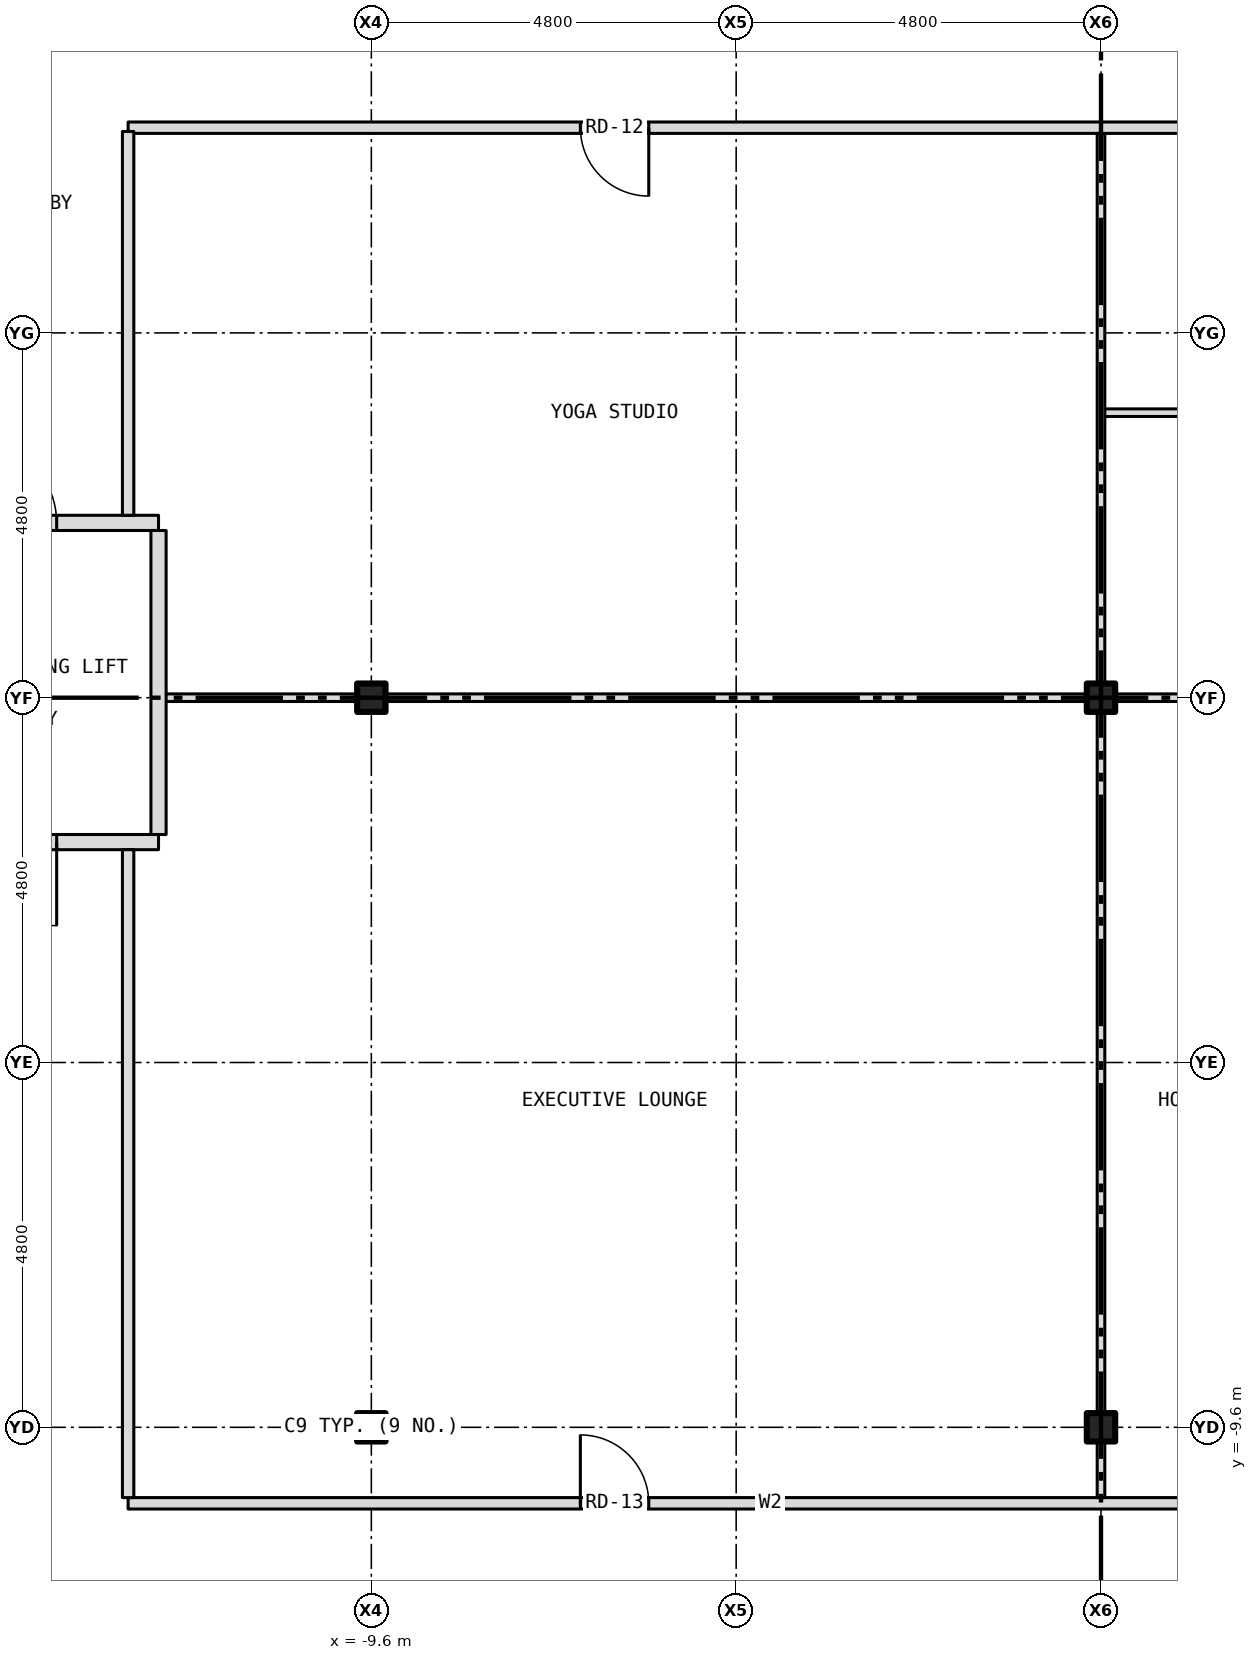
"""IFC4 building model, lengths in metres.
Left out: names, types, materials, properties, quantities, classifications, styles, units other than length and angle.
Written with IfcOpenShell. Run it as: python <this file> out.ifc"""

import sys

from ifc_helpers import new_model, si_unit, direction, frame, frame_2d, origin, origin_2d, place, context, subcontext, project, spatial, rectangle, i_section, extrude, element, fill, save


model = new_model("IFC4")
c1 = context("Model", 3, precision=1e-05, world=origin(), true_north=direction((0.0, 1.0)))
c2 = subcontext(c1, "Body", "Model", "MODEL_VIEW")
j1 = project(units=[si_unit("LENGTHUNIT", "METRE"), si_unit("PLANEANGLEUNIT", "RADIAN")], contexts=[c1])
p1 = place(None, origin())
s1 = spatial("IfcSite", under=j1, at=p1, CompositionType="ELEMENT")
p2 = place(p1, origin())
s2 = spatial("IfcBuilding", under=s1, at=p2, CompositionType="ELEMENT")
p3 = place(p2, frame((0.0, 0.0, 201.5)))
s3 = spatial("IfcBuildingStorey", under=s2, at=p3, CompositionType="ELEMENT", Elevation=201.5)
for number, where, z_axis, x_axis in (
    (1, (-9.6, -9.6, -0.15), (0.0, 0.0, 1.0), (1.0, 0.0, 0.0)),
    (2, (-9.6, 0.0, -0.15), (0.0, 0.0, 1.0), (1.0, 0.0, 0.0)),
    (3, (0.0, -9.6, -0.15), (0.0, 0.0, 1.0), (1.0, 0.0, 0.0)),
    (4, (0.0, 0.0, -0.15), (0.0, 0.0, 1.0), (1.0, 0.0, 0.0)),
):
    element("IfcColumn", number, at=place(p3, frame(where, z_axis=z_axis, x_axis=x_axis)), inside=s3, PredefinedType="COLUMN", context=c2, shape_type="SweptSolid", body=[
        extrude(i_section(OverallWidth=0.373, OverallDepth=0.373, WebThickness=0.016, FlangeThickness=0.026, at=origin_2d()), origin(), (0.0, 0.0, 1.0), 3.5),
    ])
p4 = place(p3, frame((-12.8, -10.6, 0.0), z_axis=(0.0, 0.0, 1.0), x_axis=(1.0, 0.0, 0.0)))
e5 = element("IfcWall", 5, at=p4, inside=s3, PredefinedType="PARTITIONING", context=c2, shape_type="SweptSolid", body=[
    extrude(rectangle(XDim=16.9, YDim=0.15, at=frame_2d((8.45, 0.0))), origin(), (0.0, 0.0, 1.0), 3.35),
])
p5 = place(p4, frame((5.95, 0.0, 0.0)))
e6 = element("IfcOpeningElement", 6, at=p5, cuts=e5, PredefinedType="OPENING", context=c2, shape_type="SweptSolid", body=[
    extrude(rectangle(XDim=0.9, YDim=2.1, at=frame_2d((0.45, 1.05))), frame((0.0, 0.087, 0.0), z_axis=(0.0, -1.0, 0.0), x_axis=(1.0, 0.0, 0.0)), (0.0, 0.0, 1.0), 0.174),
])
p6 = place(p3, frame((-15.68, -1.9, 0.0), z_axis=(0.0, 0.0, 1.0), x_axis=(1.0, 0.0, 0.0)))
e7 = element("IfcWall", 7, at=p6, inside=s3, PredefinedType="PARTITIONING", context=c2, shape_type="SweptSolid", body=[
    extrude(rectangle(XDim=3.28, YDim=0.2, at=frame_2d((1.64, 0.0))), origin(), (0.0, 0.0, 1.0), 3.35),
])
p7 = place(p6, frame((0.84, 0.0, 0.0)))
e8 = element("IfcOpeningElement", 8, at=p7, cuts=e7, PredefinedType="OPENING", context=c2, shape_type="SweptSolid", body=[
    extrude(rectangle(XDim=1.1, YDim=2.1, at=frame_2d((0.55, 1.05))), frame((0.0, 0.112, 0.0), z_axis=(0.0, -1.0, 0.0), x_axis=(1.0, 0.0, 0.0)), (0.0, 0.0, 1.0), 0.224),
])
p8 = place(p3, frame((-12.4, 0.0, 0.0), z_axis=(0.0, 0.0, 1.0), x_axis=(1.0, 0.0, 0.0)))
e9 = element("IfcWall", 9, at=p8, inside=s3, PredefinedType="PARTITIONING", context=c2, shape_type="SweptSolid", body=[
    extrude(rectangle(XDim=2.613, YDim=0.1, at=frame_2d((1.306, 0.0))), origin(), (0.0, 0.0, 1.0), 2.728),
])
p9 = place(p3, frame((-9.787, 0.0, 0.0), z_axis=(0.0, 0.0, 1.0), x_axis=(1.0, 0.0, 0.0)))
e10 = element("IfcWall", 10, at=p9, inside=s3, PredefinedType="PARTITIONING", context=c2, shape_type="SweptSolid", body=[
    extrude(rectangle(XDim=0.374, YDim=0.1, at=frame_2d((0.187, 0.0))), origin(), (0.0, 0.0, 1.0), 3.35),
])
p10 = place(p3, frame((-9.413, 0.0, 0.0), z_axis=(0.0, 0.0, 1.0), x_axis=(1.0, 0.0, 0.0)))
e11 = element("IfcWall", 11, at=p10, inside=s3, PredefinedType="PARTITIONING", context=c2, shape_type="SweptSolid", body=[
    extrude(rectangle(XDim=9.226, YDim=0.1, at=frame_2d((4.613, 0.0))), origin(), (0.0, 0.0, 1.0), 2.728),
])
p11 = place(p3, frame((-0.187, 0.0, 0.0), z_axis=(0.0, 0.0, 1.0), x_axis=(1.0, 0.0, 0.0)))
e12 = element("IfcWall", 12, at=p11, inside=s3, PredefinedType="PARTITIONING", context=c2, shape_type="SweptSolid", body=[
    extrude(rectangle(XDim=0.374, YDim=0.1, at=frame_2d((0.187, 0.0))), origin(), (0.0, 0.0, 1.0), 3.35),
])
p12 = place(p3, frame((0.187, 0.0, 0.0), z_axis=(0.0, 0.0, 1.0), x_axis=(1.0, 0.0, 0.0)))
e13 = element("IfcWall", 13, at=p12, inside=s3, PredefinedType="PARTITIONING", context=c2, shape_type="SweptSolid", body=[
    extrude(rectangle(XDim=3.913, YDim=0.1, at=frame_2d((1.957, 0.0))), origin(), (0.0, 0.0, 1.0), 2.728),
])
p13 = place(p3, frame((-15.68, 2.3, 0.0), z_axis=(0.0, 0.0, 1.0), x_axis=(1.0, 0.0, 0.0)))
e14 = element("IfcWall", 14, at=p13, inside=s3, PredefinedType="PARTITIONING", context=c2, shape_type="SweptSolid", body=[
    extrude(rectangle(XDim=3.28, YDim=0.2, at=frame_2d((1.64, 0.0))), origin(), (0.0, 0.0, 1.0), 3.35),
])
p14 = place(p13, frame((0.84, 0.0, 0.0)))
e15 = element("IfcOpeningElement", 15, at=p14, cuts=e14, PredefinedType="OPENING", context=c2, shape_type="SweptSolid", body=[
    extrude(rectangle(XDim=1.1, YDim=2.1, at=frame_2d((0.55, 1.05))), frame((0.0, 0.112, 0.0), z_axis=(0.0, -1.0, 0.0), x_axis=(1.0, 0.0, 0.0)), (0.0, 0.0, 1.0), 0.224),
])
p15 = place(p3, frame((0.0, 3.75, 0.0), z_axis=(0.0, 0.0, 1.0), x_axis=(1.0, 0.0, 0.0)))
e16 = element("IfcWall", 16, at=p15, inside=s3, PredefinedType="PARTITIONING", context=c2, shape_type="SweptSolid", body=[
    extrude(rectangle(XDim=4.1, YDim=0.1, at=frame_2d((2.05, 0.0))), origin(), (0.0, 0.0, 1.0), 3.35),
])
p16 = place(p3, frame((-12.8, 7.5, 0.0), z_axis=(0.0, 0.0, 1.0), x_axis=(1.0, 0.0, 0.0)))
e17 = element("IfcWall", 17, at=p16, inside=s3, PredefinedType="PARTITIONING", context=c2, shape_type="SweptSolid", body=[
    extrude(rectangle(XDim=16.9, YDim=0.15, at=frame_2d((8.45, 0.0))), origin(), (0.0, 0.0, 1.0), 3.35),
])
p17 = place(p16, frame((14.4, 0.0, 0.0)))
e18 = element("IfcOpeningElement", 18, at=p17, cuts=e17, PredefinedType="OPENING", context=c2, shape_type="SweptSolid", body=[
    extrude(rectangle(XDim=0.9, YDim=2.1, at=frame_2d((0.45, 1.05))), frame((0.0, 0.087, 0.0), z_axis=(0.0, -1.0, 0.0), x_axis=(1.0, 0.0, 0.0)), (0.0, 0.0, 1.0), 0.174),
])
p18 = place(p16, frame((5.95, 0.0, 0.0)))
e19 = element("IfcOpeningElement", 19, at=p18, cuts=e17, PredefinedType="OPENING", context=c2, shape_type="SweptSolid", body=[
    extrude(rectangle(XDim=0.9, YDim=2.1, at=frame_2d((0.45, 1.05))), frame((0.0, 0.087, 0.0), z_axis=(0.0, -1.0, 0.0), x_axis=(1.0, 0.0, 0.0)), (0.0, 0.0, 1.0), 0.174),
])
p19 = place(p3, frame((-12.8, -10.525, 0.0), z_axis=(0.0, 0.0, 1.0), x_axis=(0.0, 1.0, 0.0)))
e20 = element("IfcWall", 20, at=p19, inside=s3, PredefinedType="PARTITIONING", context=c2, shape_type="SweptSolid", body=[
    extrude(rectangle(XDim=8.525, YDim=0.15, at=frame_2d((4.262, 0.0))), origin(), (0.0, 0.0, 1.0), 3.35),
])
p20 = place(p3, frame((-12.8, 2.4, 0.0), z_axis=(0.0, 0.0, 1.0), x_axis=(0.0, 1.0, 0.0)))
e21 = element("IfcWall", 21, at=p20, inside=s3, PredefinedType="PARTITIONING", context=c2, shape_type="SweptSolid", body=[
    extrude(rectangle(XDim=5.05, YDim=0.15, at=frame_2d((2.525, 0.0))), origin(), (0.0, 0.0, 1.0), 3.35),
])
p21 = place(p3, frame((-12.4, -1.8, 0.0), z_axis=(0.0, 0.0, 1.0), x_axis=(0.0, 1.0, 0.0)))
e22 = element("IfcWall", 22, at=p21, inside=s3, PredefinedType="PARTITIONING", context=c2, shape_type="SweptSolid", body=[
    extrude(rectangle(XDim=4.0, YDim=0.2, at=frame_2d((2.0, 0.0))), origin(), (0.0, 0.0, 1.0), 3.35),
])
p22 = place(p3, frame((0.0, -10.525, 0.0), z_axis=(0.0, 0.0, 1.0), x_axis=(0.0, 1.0, 0.0)))
e23 = element("IfcWall", 23, at=p22, inside=s3, PredefinedType="PARTITIONING", context=c2, shape_type="SweptSolid", body=[
    extrude(rectangle(XDim=0.738, YDim=0.1, at=frame_2d((0.369, 0.0))), origin(), (0.0, 0.0, 1.0), 2.728),
])
p23 = place(p3, frame((0.0, -9.787, 0.0), z_axis=(0.0, 0.0, 1.0), x_axis=(0.0, 1.0, 0.0)))
e24 = element("IfcWall", 24, at=p23, inside=s3, PredefinedType="PARTITIONING", context=c2, shape_type="SweptSolid", body=[
    extrude(rectangle(XDim=0.374, YDim=0.1, at=frame_2d((0.187, 0.0))), origin(), (0.0, 0.0, 1.0), 3.35),
])
p24 = place(p3, frame((0.0, -9.413, 0.0), z_axis=(0.0, 0.0, 1.0), x_axis=(0.0, 1.0, 0.0)))
e25 = element("IfcWall", 25, at=p24, inside=s3, PredefinedType="PARTITIONING", context=c2, shape_type="SweptSolid", body=[
    extrude(rectangle(XDim=9.363, YDim=0.1, at=frame_2d((4.682, 0.0))), origin(), (0.0, 0.0, 1.0), 2.728),
])
p25 = place(p3, frame((0.0, 0.05, 0.0), z_axis=(0.0, 0.0, 1.0), x_axis=(0.0, 1.0, 0.0)))
e26 = element("IfcWall", 26, at=p25, inside=s3, PredefinedType="PARTITIONING", context=c2, shape_type="SweptSolid", body=[
    extrude(rectangle(XDim=7.375, YDim=0.1, at=frame_2d((3.688, 0.0))), origin(), (0.0, 0.0, 1.0), 2.728),
])
p26 = place(p14, origin())
e27 = element("IfcDoor", 27, at=p26, inside=s3, OperationType="SINGLE_SWING_LEFT", PredefinedType="DOOR", context=c2, shape_type="SweptSolid", body=[
    extrude(rectangle(XDim=1.1, YDim=2.1, at=frame_2d((0.55, 1.05))), frame((0.0, 0.025, 0.0), z_axis=(0.0, -1.0, 0.0), x_axis=(1.0, 0.0, 0.0)), (0.0, 0.0, 1.0), 0.05),
])
fill(e15, e27)
p27 = place(p7, origin())
e28 = element("IfcDoor", 28, at=p27, inside=s3, OperationType="SINGLE_SWING_RIGHT", PredefinedType="DOOR", context=c2, shape_type="SweptSolid", body=[
    extrude(rectangle(XDim=1.1, YDim=2.1, at=frame_2d((0.55, 1.05))), frame((0.0, 0.025, 0.0), z_axis=(0.0, -1.0, 0.0), x_axis=(1.0, 0.0, 0.0)), (0.0, 0.0, 1.0), 0.05),
])
fill(e8, e28)
p28 = place(p18, origin())
e29 = element("IfcDoor", 29, at=p28, inside=s3, OperationType="SINGLE_SWING_RIGHT", PredefinedType="DOOR", context=c2, shape_type="SweptSolid", body=[
    extrude(rectangle(XDim=0.9, YDim=2.1, at=frame_2d((0.45, 1.05))), frame((0.0, 0.025, 0.0), z_axis=(0.0, -1.0, 0.0), x_axis=(1.0, 0.0, 0.0)), (0.0, 0.0, 1.0), 0.05),
])
fill(e19, e29)
p29 = place(p5, origin())
e30 = element("IfcDoor", 30, at=p29, inside=s3, OperationType="SINGLE_SWING_LEFT", PredefinedType="DOOR", context=c2, shape_type="SweptSolid", body=[
    extrude(rectangle(XDim=0.9, YDim=2.1, at=frame_2d((0.45, 1.05))), frame((0.0, 0.025, 0.0), z_axis=(0.0, -1.0, 0.0), x_axis=(1.0, 0.0, 0.0)), (0.0, 0.0, 1.0), 0.05),
])
fill(e6, e30)
save(model, sys.argv[1])
